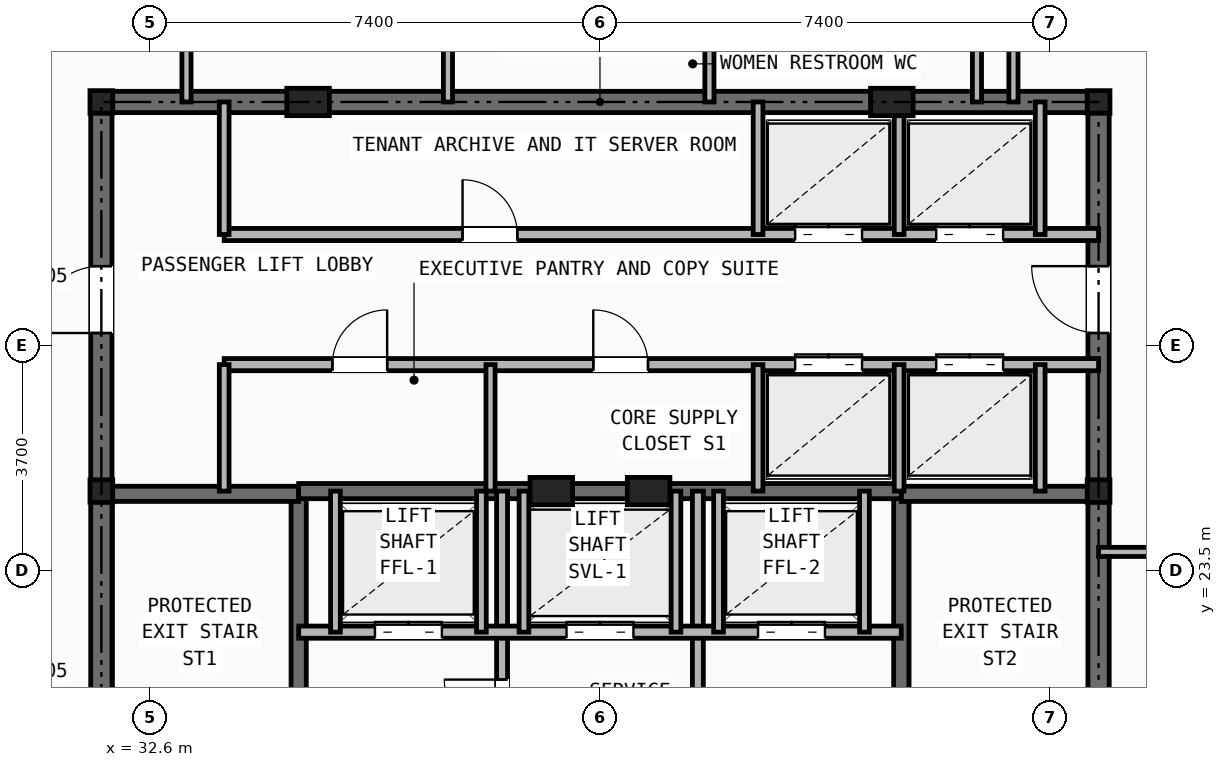
"""IFC4 building model, lengths in metres.
Left out: names, types, materials, properties, quantities, classifications, styles, units other than length and angle.
Written with IfcOpenShell. Run it as: python <this file> out.ifc"""

import sys

from ifc_helpers import new_model, si_unit, direction, frame, frame_2d, origin, origin_2d, place, context, subcontext, project, spatial, rectangle, i_section, extrude, element, fill, save


model = new_model("IFC4")
c1 = context("Model", 3, precision=1e-05, world=origin(), true_north=direction((0.0, 1.0)))
c2 = subcontext(c1, "Body", "Model", "MODEL_VIEW")
j1 = project(units=[si_unit("LENGTHUNIT", "METRE"), si_unit("PLANEANGLEUNIT", "RADIAN")], contexts=[c1])
p1 = place(None, origin())
s1 = spatial("IfcSite", under=j1, at=p1, CompositionType="ELEMENT")
p2 = place(p1, origin())
s2 = spatial("IfcBuilding", under=s1, at=p2, CompositionType="ELEMENT")
p3 = place(p2, frame((0.0, 0.0, 229.4)))
s3 = spatial("IfcBuildingStorey", under=s2, at=p3, CompositionType="ELEMENT", Elevation=229.4)
for number, where, z_axis, x_axis in (
    (1, (31.8, 24.8, 0.0), (0.0, 0.0, 1.0), (1.0, 0.0, 0.0)),
    (2, (48.2, 24.8, 0.0), (0.0, 0.0, 1.0), (1.0, 0.0, 0.0)),
    (3, (31.8, 31.2, 0.0), (0.0, 0.0, 1.0), (1.0, 0.0, 0.0)),
    (4, (48.2, 31.2, 0.0), (0.0, 0.0, 1.0), (1.0, 0.0, 0.0)),
):
    element("IfcColumn", number, at=place(p3, frame(where, z_axis=z_axis, x_axis=x_axis)), inside=s3, PredefinedType="COLUMN", context=c2, shape_type="SweptSolid", body=[
        extrude(i_section(OverallWidth=0.374, OverallDepth=0.372, WebThickness=0.016, FlangeThickness=0.026, at=origin_2d()), origin(), (0.0, 0.0, 1.0), 3.5),
    ])
for number, where, z_axis, x_axis in (
    (5, (35.2, 31.2, 0.0), (0.0, 0.0, 1.0), (1.0, 0.0, 0.0)),
    (6, (44.8, 31.2, 0.0), (0.0, 0.0, 1.0), (1.0, 0.0, 0.0)),
    (7, (39.2, 24.8, 0.0), (0.0, 0.0, 1.0), (1.0, 0.0, 0.0)),
    (8, (40.8, 24.8, 0.0), (0.0, 0.0, 1.0), (1.0, 0.0, 0.0)),
):
    element("IfcColumn", number, at=place(p3, frame(where, z_axis=z_axis, x_axis=x_axis)), inside=s3, PredefinedType="PILASTER", context=c2, shape_type="SweptSolid", body=[
        extrude(rectangle(XDim=0.7, YDim=0.45, at=origin_2d()), origin(), (0.0, 0.0, 1.0), 3.5),
    ])
p4 = place(p3, frame((31.8, 31.2, 0.0), z_axis=(0.0, 0.0, 1.0), x_axis=(1.0, 0.0, 0.0)))
e9 = element("IfcWall", 9, at=p4, inside=s3, PredefinedType="SHEAR", context=c2, shape_type="SweptSolid", body=[
    extrude(rectangle(XDim=16.4, YDim=0.35, at=frame_2d((8.2, 0.0))), origin(), (0.0, 0.0, 1.0), 3.25),
])
p5 = place(p3, frame((31.8, 16.4, 0.0), z_axis=(0.0, 0.0, 1.0), x_axis=(0.0, 1.0, 0.0)))
e10 = element("IfcWall", 10, at=p5, inside=s3, PredefinedType="SHEAR", context=c2, shape_type="SweptSolid", body=[
    extrude(rectangle(XDim=14.8, YDim=0.35, at=frame_2d((7.4, 0.0))), origin(), (0.0, 0.0, 1.0), 3.25),
])
p6 = place(p5, frame((11.0, 0.0, 0.0)))
e11 = element("IfcOpeningElement", 11, at=p6, cuts=e10, PredefinedType="OPENING", context=c2, shape_type="SweptSolid", body=[
    extrude(rectangle(XDim=1.1, YDim=2.15, at=frame_2d((0.55, 1.075))), frame((0.0, 0.185, 0.0), z_axis=(0.0, -1.0, 0.0), x_axis=(1.0, 0.0, 0.0)), (0.0, 0.0, 1.0), 0.37),
])
p7 = place(p3, frame((48.2, 16.4, 0.0), z_axis=(0.0, 0.0, 1.0), x_axis=(0.0, 1.0, 0.0)))
e12 = element("IfcWall", 12, at=p7, inside=s3, PredefinedType="SHEAR", context=c2, shape_type="SweptSolid", body=[
    extrude(rectangle(XDim=14.8, YDim=0.35, at=frame_2d((7.4, 0.0))), origin(), (0.0, 0.0, 1.0), 3.25),
])
p8 = place(p7, frame((11.0, 0.0, 0.0)))
e13 = element("IfcOpeningElement", 13, at=p8, cuts=e12, PredefinedType="OPENING", context=c2, shape_type="SweptSolid", body=[
    extrude(rectangle(XDim=1.1, YDim=2.15, at=frame_2d((0.55, 1.075))), frame((0.0, 0.185, 0.0), z_axis=(0.0, -1.0, 0.0), x_axis=(1.0, 0.0, 0.0)), (0.0, 0.0, 1.0), 0.37),
])
p9 = place(p3, frame((35.045, 16.4, 0.0), z_axis=(0.0, 0.0, 1.0), x_axis=(0.0, 1.0, 0.0)))
e14 = element("IfcWall", 14, at=p9, inside=s3, PredefinedType="SHEAR", context=c2, shape_type="SweptSolid", body=[
    extrude(rectangle(XDim=8.4, YDim=0.25, at=frame_2d((4.2, 0.0))), origin(), (0.0, 0.0, 1.0), 3.25),
])
p10 = place(p9, frame((0.45, 0.0, 0.0)))
e15 = element("IfcOpeningElement", 15, at=p10, cuts=e14, PredefinedType="OPENING", context=c2, shape_type="SweptSolid", body=[
    extrude(rectangle(XDim=0.95, YDim=2.1, at=frame_2d((0.475, 1.05))), frame((0.0, 0.135, 0.0), z_axis=(0.0, -1.0, 0.0), x_axis=(1.0, 0.0, 0.0)), (0.0, 0.0, 1.0), 0.27),
])
p11 = place(p3, frame((31.8, 24.755, 0.0), z_axis=(0.0, 0.0, 1.0), x_axis=(1.0, 0.0, 0.0)))
e16 = element("IfcWall", 16, at=p11, inside=s3, PredefinedType="SHEAR", context=c2, shape_type="SweptSolid", body=[
    extrude(rectangle(XDim=3.245, YDim=0.25, at=frame_2d((1.623, 0.0))), origin(), (0.0, 0.0, 1.0), 3.25),
])
p12 = place(p3, frame((44.955, 16.4, 0.0), z_axis=(0.0, 0.0, 1.0), x_axis=(0.0, 1.0, 0.0)))
e17 = element("IfcWall", 17, at=p12, inside=s3, PredefinedType="SHEAR", context=c2, shape_type="SweptSolid", body=[
    extrude(rectangle(XDim=8.4, YDim=0.25, at=frame_2d((4.2, 0.0))), origin(), (0.0, 0.0, 1.0), 3.25),
])
p13 = place(p12, frame((0.45, 0.0, 0.0)))
e18 = element("IfcOpeningElement", 18, at=p13, cuts=e17, PredefinedType="OPENING", context=c2, shape_type="SweptSolid", body=[
    extrude(rectangle(XDim=0.95, YDim=2.1, at=frame_2d((0.475, 1.05))), frame((0.0, 0.135, 0.0), z_axis=(0.0, -1.0, 0.0), x_axis=(1.0, 0.0, 0.0)), (0.0, 0.0, 1.0), 0.27),
])
p14 = place(p3, frame((44.955, 24.755, 0.0), z_axis=(0.0, 0.0, 1.0), x_axis=(1.0, 0.0, 0.0)))
e19 = element("IfcWall", 19, at=p14, inside=s3, PredefinedType="SHEAR", context=c2, shape_type="SweptSolid", body=[
    extrude(rectangle(XDim=3.245, YDim=0.25, at=frame_2d((1.623, 0.0))), origin(), (0.0, 0.0, 1.0), 3.25),
])
p15 = place(p3, frame((35.045, 24.8, 0.0), z_axis=(0.0, 0.0, 1.0), x_axis=(1.0, 0.0, 0.0)))
e20 = element("IfcWall", 20, at=p15, inside=s3, PredefinedType="SHEAR", context=c2, shape_type="SweptSolid", body=[
    extrude(rectangle(XDim=9.91, YDim=0.25, at=frame_2d((4.955, 0.0))), origin(), (0.0, 0.0, 1.0), 3.25),
])
p16 = place(p3, frame((38.39, 16.4, 0.0), z_axis=(0.0, 0.0, 1.0), x_axis=(0.0, 1.0, 0.0)))
e21 = element("IfcWall", 21, at=p16, inside=s3, PredefinedType="PARTITIONING", context=c2, shape_type="SweptSolid", body=[
    extrude(rectangle(XDim=8.4, YDim=0.18, at=frame_2d((4.2, 0.0))), origin(), (0.0, 0.0, 1.0), 2.978),
])
p17 = place(p16, frame((1.8, 0.0, 0.0)))
e22 = element("IfcOpeningElement", 22, at=p17, cuts=e21, PredefinedType="OPENING", context=c2, shape_type="SweptSolid", body=[
    extrude(rectangle(XDim=0.85, YDim=2.05, at=frame_2d((0.425, 1.025))), frame((0.0, 0.1, 0.0), z_axis=(0.0, -1.0, 0.0), x_axis=(1.0, 0.0, 0.0)), (0.0, 0.0, 1.0), 0.2),
])
p18 = place(p16, frame((4.35, 0.0, 0.0)))
e23 = element("IfcOpeningElement", 23, at=p18, cuts=e21, PredefinedType="OPENING", context=c2, shape_type="SweptSolid", body=[
    extrude(rectangle(XDim=0.95, YDim=2.1, at=frame_2d((0.475, 1.05))), frame((0.0, 0.1, 0.0), z_axis=(0.0, -1.0, 0.0), x_axis=(1.0, 0.0, 0.0)), (0.0, 0.0, 1.0), 0.2),
])
p19 = place(p3, frame((41.61, 16.4, 0.0), z_axis=(0.0, 0.0, 1.0), x_axis=(0.0, 1.0, 0.0)))
e24 = element("IfcWall", 24, at=p19, inside=s3, PredefinedType="PARTITIONING", context=c2, shape_type="SweptSolid", body=[
    extrude(rectangle(XDim=8.4, YDim=0.18, at=frame_2d((4.2, 0.0))), origin(), (0.0, 0.0, 1.0), 2.978),
])
p20 = place(p19, frame((1.8, 0.0, 0.0)))
e25 = element("IfcOpeningElement", 25, at=p20, cuts=e24, PredefinedType="OPENING", context=c2, shape_type="SweptSolid", body=[
    extrude(rectangle(XDim=0.85, YDim=2.05, at=frame_2d((0.425, 1.025))), frame((0.0, 0.1, 0.0), z_axis=(0.0, -1.0, 0.0), x_axis=(1.0, 0.0, 0.0)), (0.0, 0.0, 1.0), 0.2),
])
p21 = place(p3, frame((35.045, 22.48, 0.0), z_axis=(0.0, 0.0, 1.0), x_axis=(1.0, 0.0, 0.0)))
e26 = element("IfcWall", 26, at=p21, inside=s3, PredefinedType="SOLIDWALL", context=c2, shape_type="SweptSolid", body=[
    extrude(rectangle(XDim=9.91, YDim=0.2, at=frame_2d((4.955, 0.0))), origin(), (0.0, 0.0, 1.0), 3.25),
])
p22 = place(p21, frame((1.255, 0.0, 0.0)))
e27 = element("IfcOpeningElement", 27, at=p22, cuts=e26, PredefinedType="OPENING", context=c2, shape_type="SweptSolid", body=[
    extrude(rectangle(XDim=1.1, YDim=2.15, at=frame_2d((0.55, 1.075))), frame((0.0, 0.11, 0.0), z_axis=(0.0, -1.0, 0.0), x_axis=(1.0, 0.0, 0.0)), (0.0, 0.0, 1.0), 0.22),
])
p23 = place(p21, frame((7.555, 0.0, 0.0)))
e28 = element("IfcOpeningElement", 28, at=p23, cuts=e26, PredefinedType="OPENING", context=c2, shape_type="SweptSolid", body=[
    extrude(rectangle(XDim=1.1, YDim=2.15, at=frame_2d((0.55, 1.075))), frame((0.0, 0.11, 0.0), z_axis=(0.0, -1.0, 0.0), x_axis=(1.0, 0.0, 0.0)), (0.0, 0.0, 1.0), 0.22),
])
p24 = place(p21, frame((4.405, 0.0, 0.0)))
e29 = element("IfcOpeningElement", 29, at=p24, cuts=e26, PredefinedType="OPENING", context=c2, shape_type="SweptSolid", body=[
    extrude(rectangle(XDim=1.1, YDim=2.15, at=frame_2d((0.55, 1.075))), frame((0.0, 0.11, 0.0), z_axis=(0.0, -1.0, 0.0), x_axis=(1.0, 0.0, 0.0)), (0.0, 0.0, 1.0), 0.22),
])
for number, where, z_axis, x_axis in (
    (30, (35.65, 22.48, 0.0), (0.0, 0.0, 1.0), (0.0, 1.0, 0.0)),
    (31, (38.05, 22.48, 0.0), (0.0, 0.0, 1.0), (0.0, 1.0, 0.0)),
    (32, (41.95, 22.48, 0.0), (0.0, 0.0, 1.0), (0.0, 1.0, 0.0)),
    (33, (44.35, 22.48, 0.0), (0.0, 0.0, 1.0), (0.0, 1.0, 0.0)),
    (34, (38.75, 22.48, 0.0), (0.0, 0.0, 1.0), (0.0, 1.0, 0.0)),
    (35, (41.25, 22.48, 0.0), (0.0, 0.0, 1.0), (0.0, 1.0, 0.0)),
):
    element("IfcWall", number, at=place(p3, frame(where, z_axis=z_axis, x_axis=x_axis)), inside=s3, PredefinedType="SOLIDWALL", context=c2, shape_type="SweptSolid", body=[
        extrude(rectangle(XDim=2.32, YDim=0.16, at=frame_2d((1.16, 0.0))), origin(), (0.0, 0.0, 1.0), 3.25),
    ])
p25 = place(p3, frame((33.82, 29.02, 0.0), z_axis=(0.0, 0.0, 1.0), x_axis=(1.0, 0.0, 0.0)))
e36 = element("IfcWall", 36, at=p25, inside=s3, PredefinedType="SOLIDWALL", context=c2, shape_type="SweptSolid", body=[
    extrude(rectangle(XDim=14.38, YDim=0.2, at=frame_2d((7.19, 0.0))), origin(), (0.0, 0.0, 1.0), 2.705),
])
p26 = place(p25, frame((3.92, 0.0, 0.0)))
e37 = element("IfcOpeningElement", 37, at=p26, cuts=e36, PredefinedType="OPENING", context=c2, shape_type="SweptSolid", body=[
    extrude(rectangle(XDim=0.9, YDim=2.1, at=frame_2d((0.45, 1.05))), frame((0.0, 0.11, 0.0), z_axis=(0.0, -1.0, 0.0), x_axis=(1.0, 0.0, 0.0)), (0.0, 0.0, 1.0), 0.22),
])
p27 = place(p25, frame((9.39, 0.0, 0.0)))
e38 = element("IfcOpeningElement", 38, at=p27, cuts=e36, PredefinedType="OPENING", context=c2, shape_type="SweptSolid", body=[
    extrude(rectangle(XDim=1.1, YDim=2.15, at=frame_2d((0.55, 1.075))), frame((0.0, 0.11, 0.0), z_axis=(0.0, -1.0, 0.0), x_axis=(1.0, 0.0, 0.0)), (0.0, 0.0, 1.0), 0.22),
])
p28 = place(p25, frame((11.71, 0.0, 0.0)))
e39 = element("IfcOpeningElement", 39, at=p28, cuts=e36, PredefinedType="OPENING", context=c2, shape_type="SweptSolid", body=[
    extrude(rectangle(XDim=1.1, YDim=2.15, at=frame_2d((0.55, 1.075))), frame((0.0, 0.11, 0.0), z_axis=(0.0, -1.0, 0.0), x_axis=(1.0, 0.0, 0.0)), (0.0, 0.0, 1.0), 0.22),
])
p29 = place(p3, frame((33.82, 26.88, 0.0), z_axis=(0.0, 0.0, 1.0), x_axis=(1.0, 0.0, 0.0)))
e40 = element("IfcWall", 40, at=p29, inside=s3, PredefinedType="SOLIDWALL", context=c2, shape_type="SweptSolid", body=[
    extrude(rectangle(XDim=14.38, YDim=0.2, at=frame_2d((7.19, 0.0))), origin(), (0.0, 0.0, 1.0), 2.705),
])
p30 = place(p29, frame((1.78, 0.0, 0.0)))
e41 = element("IfcOpeningElement", 41, at=p30, cuts=e40, PredefinedType="OPENING", context=c2, shape_type="SweptSolid", body=[
    extrude(rectangle(XDim=0.9, YDim=2.1, at=frame_2d((0.45, 1.05))), frame((0.0, 0.11, 0.0), z_axis=(0.0, -1.0, 0.0), x_axis=(1.0, 0.0, 0.0)), (0.0, 0.0, 1.0), 0.22),
])
p31 = place(p29, frame((6.07, 0.0, 0.0)))
e42 = element("IfcOpeningElement", 42, at=p31, cuts=e40, PredefinedType="OPENING", context=c2, shape_type="SweptSolid", body=[
    extrude(rectangle(XDim=0.9, YDim=2.1, at=frame_2d((0.45, 1.05))), frame((0.0, 0.11, 0.0), z_axis=(0.0, -1.0, 0.0), x_axis=(1.0, 0.0, 0.0)), (0.0, 0.0, 1.0), 0.22),
])
p32 = place(p29, frame((9.39, 0.0, 0.0)))
e43 = element("IfcOpeningElement", 43, at=p32, cuts=e40, PredefinedType="OPENING", context=c2, shape_type="SweptSolid", body=[
    extrude(rectangle(XDim=1.1, YDim=2.15, at=frame_2d((0.55, 1.075))), frame((0.0, 0.11, 0.0), z_axis=(0.0, -1.0, 0.0), x_axis=(1.0, 0.0, 0.0)), (0.0, 0.0, 1.0), 0.22),
])
p33 = place(p29, frame((11.71, 0.0, 0.0)))
e44 = element("IfcOpeningElement", 44, at=p33, cuts=e40, PredefinedType="OPENING", context=c2, shape_type="SweptSolid", body=[
    extrude(rectangle(XDim=1.1, YDim=2.15, at=frame_2d((0.55, 1.075))), frame((0.0, 0.11, 0.0), z_axis=(0.0, -1.0, 0.0), x_axis=(1.0, 0.0, 0.0)), (0.0, 0.0, 1.0), 0.22),
])
p34 = place(p3, frame((33.82, 29.02, 0.0), z_axis=(0.0, 0.0, 1.0), x_axis=(0.0, 1.0, 0.0)))
e45 = element("IfcWall", 45, at=p34, inside=s3, PredefinedType="SOLIDWALL", context=c2, shape_type="SweptSolid", body=[
    extrude(rectangle(XDim=2.18, YDim=0.16, at=frame_2d((1.09, 0.0))), origin(), (0.0, 0.0, 1.0), 2.978),
])
p35 = place(p3, frame((33.82, 24.8, 0.0), z_axis=(0.0, 0.0, 1.0), x_axis=(0.0, 1.0, 0.0)))
e46 = element("IfcWall", 46, at=p35, inside=s3, PredefinedType="SOLIDWALL", context=c2, shape_type="SweptSolid", body=[
    extrude(rectangle(XDim=2.08, YDim=0.16, at=frame_2d((1.04, 0.0))), origin(), (0.0, 0.0, 1.0), 3.25),
])
p36 = place(p3, frame((38.2, 24.8, 0.0), z_axis=(0.0, 0.0, 1.0), x_axis=(0.0, 1.0, 0.0)))
e47 = element("IfcWall", 47, at=p36, inside=s3, PredefinedType="PARTITIONING", context=c2, shape_type="SweptSolid", body=[
    extrude(rectangle(XDim=2.08, YDim=0.15, at=frame_2d((1.04, 0.0))), origin(), (0.0, 0.0, 1.0), 3.25),
])
for number, where, z_axis, x_axis in (
    (48, (42.6, 29.02, 0.0), (0.0, 0.0, 1.0), (0.0, 1.0, 0.0)),
    (49, (44.92, 29.02, 0.0), (0.0, 0.0, 1.0), (0.0, 1.0, 0.0)),
    (50, (47.24, 29.02, 0.0), (0.0, 0.0, 1.0), (0.0, 1.0, 0.0)),
):
    element("IfcWall", number, at=place(p3, frame(where, z_axis=z_axis, x_axis=x_axis)), inside=s3, PredefinedType="SOLIDWALL", context=c2, shape_type="SweptSolid", body=[
        extrude(rectangle(XDim=2.18, YDim=0.16, at=frame_2d((1.09, 0.0))), origin(), (0.0, 0.0, 1.0), 2.978),
    ])
for number, where, z_axis, x_axis in (
    (51, (42.6, 24.8, 0.0), (0.0, 0.0, 1.0), (0.0, 1.0, 0.0)),
    (52, (44.92, 24.8, 0.0), (0.0, 0.0, 1.0), (0.0, 1.0, 0.0)),
    (53, (47.24, 24.8, 0.0), (0.0, 0.0, 1.0), (0.0, 1.0, 0.0)),
):
    element("IfcWall", number, at=place(p3, frame(where, z_axis=z_axis, x_axis=x_axis)), inside=s3, PredefinedType="SOLIDWALL", context=c2, shape_type="SweptSolid", body=[
        extrude(rectangle(XDim=2.08, YDim=0.16, at=frame_2d((1.04, 0.0))), origin(), (0.0, 0.0, 1.0), 3.25),
    ])
for number, where, z_axis, x_axis in (
    (54, (33.2, 31.2, 0.0), (0.0, 0.0, 1.0), (0.0, 1.0, 0.0)),
    (55, (46.2, 31.2, 0.0), (0.0, 0.0, 1.0), (0.0, 1.0, 0.0)),
    (56, (37.5, 31.2, 0.0), (0.0, 0.0, 1.0), (0.0, 1.0, 0.0)),
    (57, (41.8, 31.2, 0.0), (0.0, 0.0, 1.0), (0.0, 1.0, 0.0)),
):
    element("IfcWall", number, at=place(p3, frame(where, z_axis=z_axis, x_axis=x_axis)), inside=s3, PredefinedType="PARTITIONING", context=c2, shape_type="SweptSolid", body=[
        extrude(rectangle(XDim=2.6, YDim=0.15, at=frame_2d((1.3, 0.0))), origin(), (0.0, 0.0, 1.0), 2.978),
    ])
p37 = place(p3, frame((46.8, 31.2, 0.0), z_axis=(0.0, 0.0, 1.0), x_axis=(0.0, 1.0, 0.0)))
e58 = element("IfcWall", 58, at=p37, inside=s3, PredefinedType="PARTITIONING", context=c2, shape_type="SweptSolid", body=[
    extrude(rectangle(XDim=4.5, YDim=0.15, at=frame_2d((2.25, 0.0))), origin(), (0.0, 0.0, 1.0), 2.978),
])
p38 = place(p3, frame((48.2, 23.8, 0.0), z_axis=(0.0, 0.0, 1.0), x_axis=(1.0, 0.0, 0.0)))
e59 = element("IfcWall", 59, at=p38, inside=s3, PredefinedType="PARTITIONING", context=c2, shape_type="SweptSolid", body=[
    extrude(rectangle(XDim=10.602, YDim=0.15, at=frame_2d((5.301, 0.0))), origin(), (0.0, 0.0, 1.0), 2.628),
])
p39 = place(p38, frame((1.4, 0.0, 0.0)))
e60 = element("IfcOpeningElement", 60, at=p39, cuts=e59, PredefinedType="OPENING", context=c2, shape_type="SweptSolid", body=[
    extrude(rectangle(XDim=0.95, YDim=2.1, at=frame_2d((0.475, 1.05))), frame((0.0, 0.085, 0.0), z_axis=(0.0, -1.0, 0.0), x_axis=(1.0, 0.0, 0.0)), (0.0, 0.0, 1.0), 0.17),
])
p40 = place(p18, origin())
e61 = element("IfcDoor", 61, at=p40, inside=s3, OperationType="SINGLE_SWING_RIGHT", PredefinedType="DOOR", context=c2, shape_type="SweptSolid", body=[
    extrude(rectangle(XDim=0.95, YDim=2.1, at=frame_2d((0.475, 1.05))), frame((0.0, 0.025, 0.0), z_axis=(0.0, -1.0, 0.0), x_axis=(1.0, 0.0, 0.0)), (0.0, 0.0, 1.0), 0.05),
])
fill(e23, e61)
p41 = place(p22, origin())
e62 = element("IfcDoor", 62, at=p41, inside=s3, OperationType="DOUBLE_DOOR_SLIDING", PredefinedType="DOOR", context=c2, shape_type="SweptSolid", body=[
    extrude(rectangle(XDim=1.1, YDim=2.15, at=frame_2d((0.55, 1.075))), frame((0.0, 0.025, 0.0), z_axis=(0.0, -1.0, 0.0), x_axis=(1.0, 0.0, 0.0)), (0.0, 0.0, 1.0), 0.05),
])
fill(e27, e62)
p42 = place(p23, origin())
e63 = element("IfcDoor", 63, at=p42, inside=s3, OperationType="DOUBLE_DOOR_SLIDING", PredefinedType="DOOR", context=c2, shape_type="SweptSolid", body=[
    extrude(rectangle(XDim=1.1, YDim=2.15, at=frame_2d((0.55, 1.075))), frame((0.0, 0.025, 0.0), z_axis=(0.0, -1.0, 0.0), x_axis=(1.0, 0.0, 0.0)), (0.0, 0.0, 1.0), 0.05),
])
fill(e28, e63)
p43 = place(p24, origin())
e64 = element("IfcDoor", 64, at=p43, inside=s3, OperationType="DOUBLE_DOOR_SLIDING", PredefinedType="DOOR", context=c2, shape_type="SweptSolid", body=[
    extrude(rectangle(XDim=1.1, YDim=2.15, at=frame_2d((0.55, 1.075))), frame((0.0, 0.025, 0.0), z_axis=(0.0, -1.0, 0.0), x_axis=(1.0, 0.0, 0.0)), (0.0, 0.0, 1.0), 0.05),
])
fill(e29, e64)
p44 = place(p6, origin())
e65 = element("IfcDoor", 65, at=p44, inside=s3, OperationType="SINGLE_SWING_LEFT", PredefinedType="DOOR", context=c2, shape_type="SweptSolid", body=[
    extrude(rectangle(XDim=1.1, YDim=2.15, at=frame_2d((0.55, 1.075))), frame((0.0, 0.025, 0.0), z_axis=(0.0, -1.0, 0.0), x_axis=(1.0, 0.0, 0.0)), (0.0, 0.0, 1.0), 0.05),
])
fill(e11, e65)
p45 = place(p8, origin())
e66 = element("IfcDoor", 66, at=p45, inside=s3, OperationType="SINGLE_SWING_RIGHT", PredefinedType="DOOR", context=c2, shape_type="SweptSolid", body=[
    extrude(rectangle(XDim=1.1, YDim=2.15, at=frame_2d((0.55, 1.075))), frame((0.0, 0.025, 0.0), z_axis=(0.0, -1.0, 0.0), x_axis=(1.0, 0.0, 0.0)), (0.0, 0.0, 1.0), 0.05),
])
fill(e13, e66)
p46 = place(p26, origin())
e67 = element("IfcDoor", 67, at=p46, inside=s3, OperationType="SINGLE_SWING_LEFT", PredefinedType="DOOR", context=c2, shape_type="SweptSolid", body=[
    extrude(rectangle(XDim=0.9, YDim=2.1, at=frame_2d((0.45, 1.05))), frame((0.0, 0.025, 0.0), z_axis=(0.0, -1.0, 0.0), x_axis=(1.0, 0.0, 0.0)), (0.0, 0.0, 1.0), 0.05),
])
fill(e37, e67)
p47 = place(p30, origin())
e68 = element("IfcDoor", 68, at=p47, inside=s3, OperationType="SINGLE_SWING_RIGHT", PredefinedType="DOOR", context=c2, shape_type="SweptSolid", body=[
    extrude(rectangle(XDim=0.9, YDim=2.1, at=frame_2d((0.45, 1.05))), frame((0.0, 0.025, 0.0), z_axis=(0.0, -1.0, 0.0), x_axis=(1.0, 0.0, 0.0)), (0.0, 0.0, 1.0), 0.05),
])
fill(e41, e68)
p48 = place(p31, origin())
e69 = element("IfcDoor", 69, at=p48, inside=s3, OperationType="SINGLE_SWING_LEFT", PredefinedType="DOOR", context=c2, shape_type="SweptSolid", body=[
    extrude(rectangle(XDim=0.9, YDim=2.1, at=frame_2d((0.45, 1.05))), frame((0.0, 0.025, 0.0), z_axis=(0.0, -1.0, 0.0), x_axis=(1.0, 0.0, 0.0)), (0.0, 0.0, 1.0), 0.05),
])
fill(e42, e69)
p49 = place(p27, origin())
e70 = element("IfcDoor", 70, at=p49, inside=s3, OperationType="DOUBLE_DOOR_SLIDING", PredefinedType="DOOR", context=c2, shape_type="SweptSolid", body=[
    extrude(rectangle(XDim=1.1, YDim=2.15, at=frame_2d((0.55, 1.075))), frame((0.0, 0.025, 0.0), z_axis=(0.0, -1.0, 0.0), x_axis=(1.0, 0.0, 0.0)), (0.0, 0.0, 1.0), 0.05),
])
fill(e38, e70)
p50 = place(p28, origin())
e71 = element("IfcDoor", 71, at=p50, inside=s3, OperationType="DOUBLE_DOOR_SLIDING", PredefinedType="DOOR", context=c2, shape_type="SweptSolid", body=[
    extrude(rectangle(XDim=1.1, YDim=2.15, at=frame_2d((0.55, 1.075))), frame((0.0, 0.025, 0.0), z_axis=(0.0, -1.0, 0.0), x_axis=(1.0, 0.0, 0.0)), (0.0, 0.0, 1.0), 0.05),
])
fill(e39, e71)
p51 = place(p32, origin())
e72 = element("IfcDoor", 72, at=p51, inside=s3, OperationType="DOUBLE_DOOR_SLIDING", PredefinedType="DOOR", context=c2, shape_type="SweptSolid", body=[
    extrude(rectangle(XDim=1.1, YDim=2.15, at=frame_2d((0.55, 1.075))), frame((0.0, 0.025, 0.0), z_axis=(0.0, -1.0, 0.0), x_axis=(1.0, 0.0, 0.0)), (0.0, 0.0, 1.0), 0.05),
])
fill(e43, e72)
p52 = place(p33, origin())
e73 = element("IfcDoor", 73, at=p52, inside=s3, OperationType="DOUBLE_DOOR_SLIDING", PredefinedType="DOOR", context=c2, shape_type="SweptSolid", body=[
    extrude(rectangle(XDim=1.1, YDim=2.15, at=frame_2d((0.55, 1.075))), frame((0.0, 0.025, 0.0), z_axis=(0.0, -1.0, 0.0), x_axis=(1.0, 0.0, 0.0)), (0.0, 0.0, 1.0), 0.05),
])
fill(e44, e73)
save(model, sys.argv[1])
